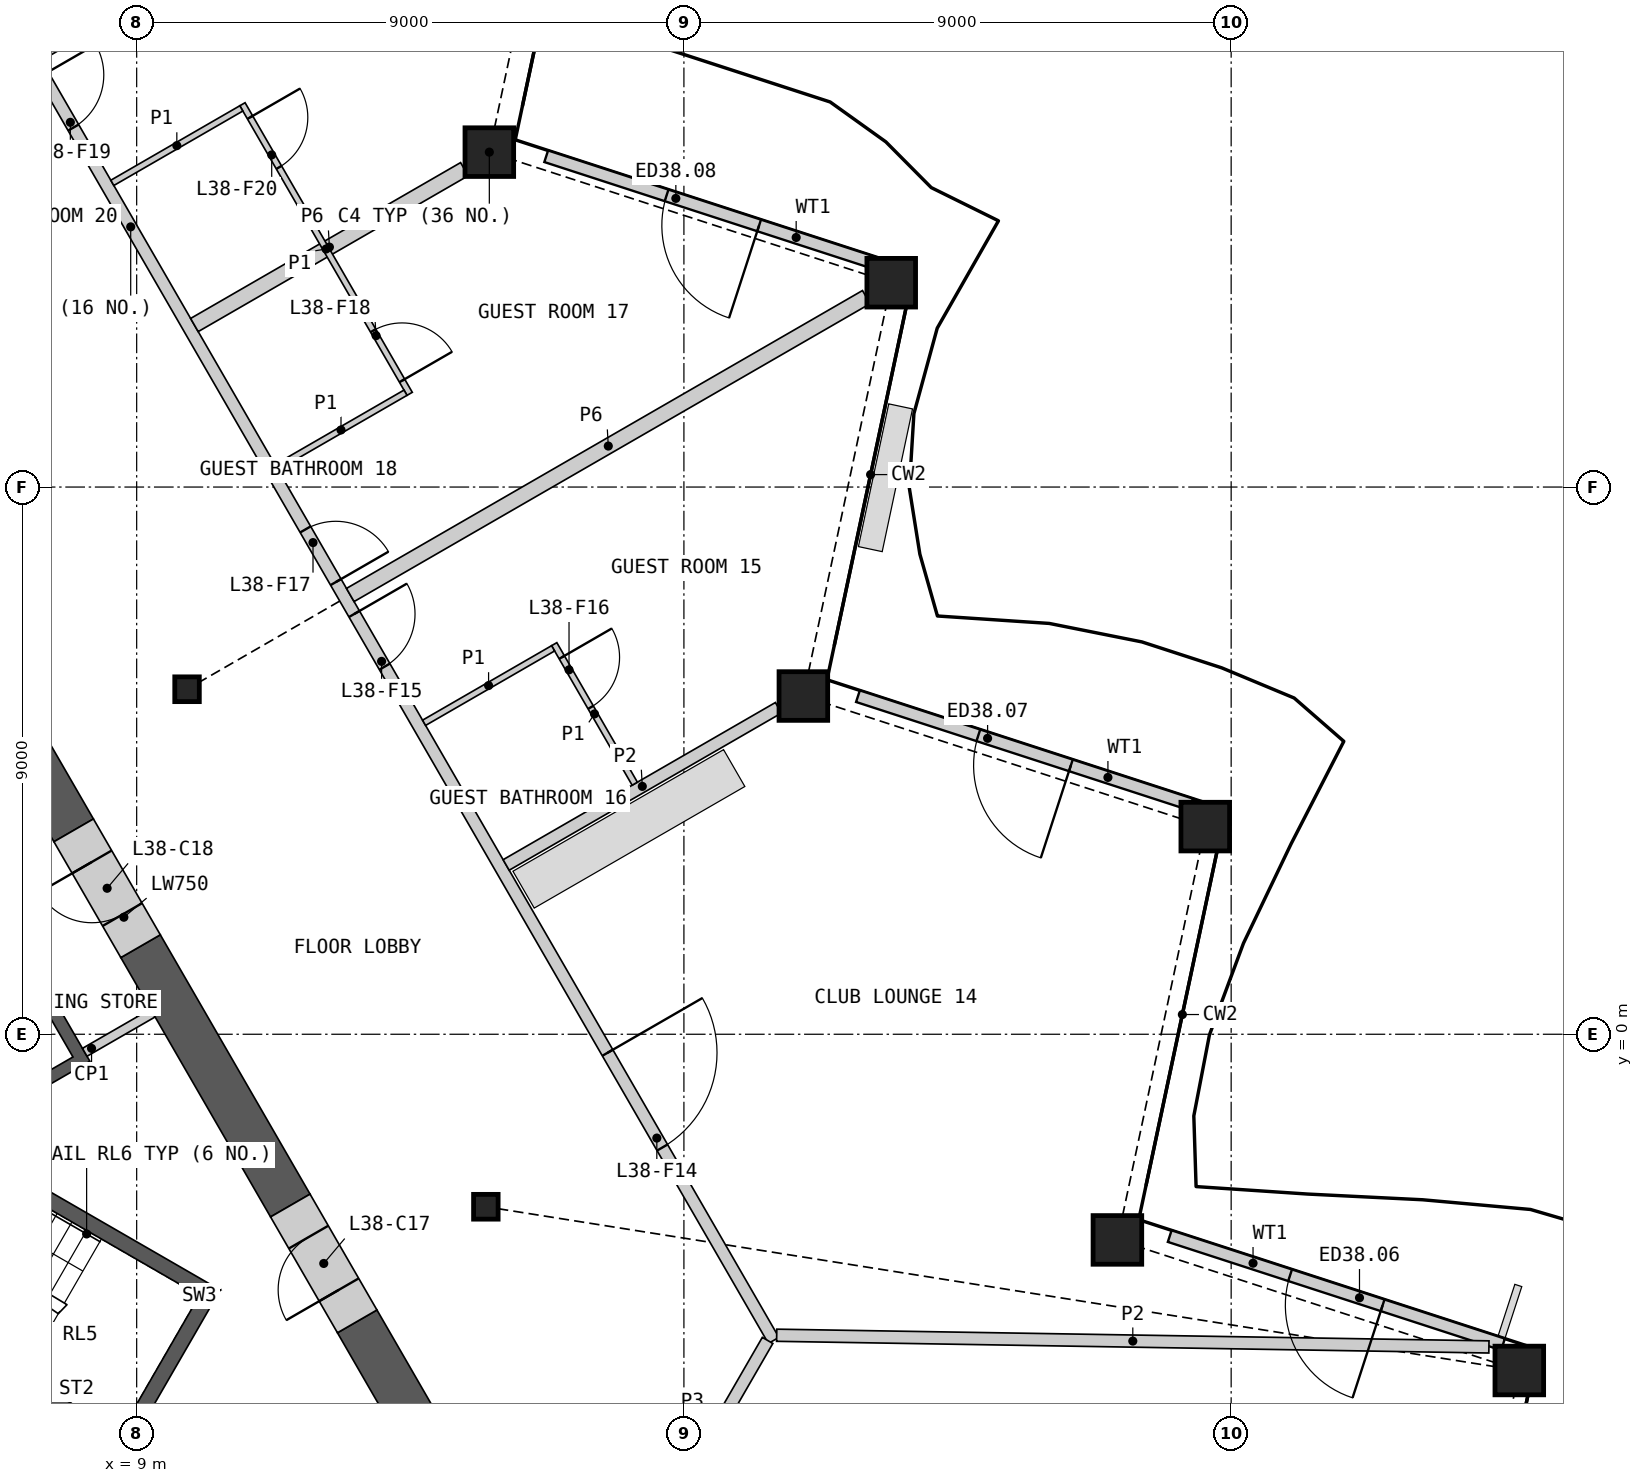
"""IFC4 building model, lengths in metres.
Left out: names, types, materials, properties, quantities, classifications, styles, units other than length and angle.
Written with IfcOpenShell. Run it as: python <this file> out.ifc"""

import sys

from ifc_helpers import new_model, si_unit, direction, frame, frame_2d, origin, origin_2d, place, context, subcontext, project, spatial, polyline, rectangle, hollow_rectangle, i_section, outline, extrude, element, fill, save


model = new_model("IFC4")
c1 = context("Model", 3, precision=1e-05, world=origin(), true_north=direction((0.0, 1.0)))
c2 = subcontext(c1, "Body", "Model", "MODEL_VIEW")
j1 = project(units=[si_unit("LENGTHUNIT", "METRE"), si_unit("PLANEANGLEUNIT", "RADIAN")], contexts=[c1])
p1 = place(None, origin())
s1 = spatial("IfcSite", under=j1, at=p1, CompositionType="ELEMENT")
p2 = place(p1, origin())
s2 = spatial("IfcBuilding", under=s1, at=p2, CompositionType="ELEMENT")
p3 = place(p2, frame((0.0, 0.0, 180.0)))
s3 = spatial("IfcBuildingStorey", under=s2, at=p3, CompositionType="ELEMENT", Elevation=180.0)
for number, where, z_axis, x_axis in (
    (1, (31.739, -5.53, 0.0), (0.0, 0.0, 1.0), (1.0, 0.0, 0.0)),
    (2, (25.129, -3.383, 0.0), (0.0, 0.0, 1.0), (1.0, 0.0, 0.0)),
    (3, (26.574, 3.415, 0.0), (0.0, 0.0, 1.0), (1.0, 0.0, 0.0)),
    (4, (19.965, 5.563, 0.0), (0.0, 0.0, 1.0), (1.0, 0.0, 0.0)),
    (5, (21.409, 12.361, 0.0), (0.0, 0.0, 1.0), (1.0, 0.0, 0.0)),
    (6, (14.8, 14.508, 0.0), (0.0, 0.0, 1.0), (1.0, 0.0, 0.0)),
):
    element("IfcColumn", number, at=place(p3, frame(where, z_axis=z_axis, x_axis=x_axis)), inside=s3, PredefinedType="COLUMN", context=c2, shape_type="SweptSolid", body=[
        extrude(hollow_rectangle(XDim=0.8, YDim=0.8, WallThickness=0.05, at=origin_2d()), origin(), (0.0, 0.0, 1.0), 3.6),
    ])
for number, where, z_axis, x_axis in (
    (7, (14.743, -2.837, 0.0), (0.0, 0.0, 1.0), (1.0, 0.0, 0.0)),
    (8, (9.828, 5.675, 0.0), (0.0, 0.0, 1.0), (1.0, 0.0, 0.0)),
):
    element("IfcColumn", number, at=place(p3, frame(where, z_axis=z_axis, x_axis=x_axis)), inside=s3, PredefinedType="COLUMN", context=c2, shape_type="SweptSolid", body=[
        extrude(i_section(OverallWidth=0.404, OverallDepth=0.407, WebThickness=0.027, FlangeThickness=0.044, at=origin_2d()), origin(), (0.0, 0.0, 1.0), 3.6),
    ])
p4 = place(p3, frame((31.471, -5.101, 0.0), z_axis=(0.0, 0.0, 1.0), x_axis=(-0.951053678976, 0.30902572661, 0.0)))
e9 = element("IfcWall", 9, at=p4, inside=s3, PredefinedType="SOLIDWALL", context=c2, shape_type="SweptSolid", body=[
    extrude(rectangle(XDim=5.763, YDim=0.2, at=frame_2d((2.882, 0.0))), origin(), (0.0, 0.0, 1.0), 2.701),
])
p5 = place(p4, frame((2.082, 0.0, 0.0)))
e10 = element("IfcOpeningElement", 10, at=p5, cuts=e9, PredefinedType="OPENING", context=c2, shape_type="SweptSolid", body=[
    extrude(rectangle(XDim=1.6, YDim=2.4, at=frame_2d((0.8, 1.2))), frame((0.0, 0.11, 0.0), z_axis=(0.0, -1.0, 0.0), x_axis=(1.0, 0.0, 0.0)), (0.0, 0.0, 1.0), 0.22),
])
p6 = place(p3, frame((26.344, 3.779, 0.0), z_axis=(0.0, 0.0, 1.0), x_axis=(-0.951049633358, 0.309038177075, 0.0)))
e11 = element("IfcWall", 11, at=p6, inside=s3, PredefinedType="SOLIDWALL", context=c2, shape_type="SweptSolid", body=[
    extrude(rectangle(XDim=5.763, YDim=0.2, at=frame_2d((2.881, 0.0))), origin(), (0.0, 0.0, 1.0), 2.701),
])
p7 = place(p6, frame((2.082, 0.0, 0.0)))
e12 = element("IfcOpeningElement", 12, at=p7, cuts=e11, PredefinedType="OPENING", context=c2, shape_type="SweptSolid", body=[
    extrude(rectangle(XDim=1.6, YDim=2.4, at=frame_2d((0.8, 1.2))), frame((0.0, 0.11, 0.0), z_axis=(0.0, -1.0, 0.0), x_axis=(1.0, 0.0, 0.0)), (0.0, 0.0, 1.0), 0.22),
])
p8 = place(p3, frame((21.217, 12.659, 0.0), z_axis=(0.0, 0.0, 1.0), x_axis=(-0.951053678976, 0.30902572661, 0.0)))
e13 = element("IfcWall", 13, at=p8, inside=s3, PredefinedType="SOLIDWALL", context=c2, shape_type="SweptSolid", body=[
    extrude(rectangle(XDim=5.763, YDim=0.2, at=frame_2d((2.882, 0.0))), origin(), (0.0, 0.0, 1.0), 2.701),
])
p9 = place(p8, frame((2.082, 0.0, 0.0)))
e14 = element("IfcOpeningElement", 14, at=p9, cuts=e13, PredefinedType="OPENING", context=c2, shape_type="SweptSolid", body=[
    extrude(rectangle(XDim=1.6, YDim=2.4, at=frame_2d((0.8, 1.2))), frame((0.0, 0.11, 0.0), z_axis=(0.0, -1.0, 0.0), x_axis=(1.0, 0.0, 0.0)), (0.0, 0.0, 1.0), 0.22),
])
p10 = place(p3, origin())
e15 = element("IfcWall", 15, at=p10, inside=s3, PredefinedType="SHEAR", context=c2, shape_type="SweptSolid", body=[
    extrude(outline(polyline([(3.76, 2.287), (5.931, 3.54), (8.231, -0.444), (6.061, -1.697), (5.96, -1.524), (7.952, -0.374), (5.852, 3.263), (3.861, 2.113), (3.76, 2.287)])), origin(), (0.0, 0.0, 1.0), 3.25),
])
p11 = place(p3, origin())
e16 = element("IfcWall", 16, at=p11, inside=s3, PredefinedType="SHEAR", context=c2, shape_type="SweptSolid", body=[
    extrude(outline(polyline([(3.763, -3.956), (8.83, -6.881), (8.738, -6.539), (3.888, -3.739), (3.763, -3.956)])), origin(), (0.0, 0.0, 1.0), 3.25),
])
p12 = place(p3, origin())
e17 = element("IfcWall", 17, at=p12, inside=s3, PredefinedType="SHEAR", context=c2, shape_type="SweptSolid", body=[
    extrude(outline(polyline([(8.83, -6.881), (10.374, -4.206), (10.032, -4.298), (8.738, -6.539), (8.83, -6.881)])), origin(), (0.0, 0.0, 1.0), 3.25),
])
p13 = place(p3, origin())
e18 = element("IfcWall", 18, at=p13, inside=s3, PredefinedType="SHEAR", context=c2, shape_type="SweptSolid", body=[
    extrude(outline(polyline([(10.032, -4.298), (10.374, -4.206), (5.307, -1.281), (5.182, -1.498), (10.032, -4.298)])), origin(), (0.0, 0.0, 1.0), 3.25),
])
p14 = place(p3, frame((9.266, 0.349, 0.0), z_axis=(0.0, 0.0, 1.0), x_axis=(-0.866003189247, -0.500038474733, 0.0)))
e19 = element("IfcWall", 19, at=p14, inside=s3, PredefinedType="PARTITIONING", context=c2, shape_type="SweptSolid", body=[
    extrude(rectangle(XDim=1.293, YDim=0.15, at=frame_2d((0.646, 0.0))), origin(), (0.0, 0.0, 1.0), 3.25),
])
p15 = place(p3, frame((7.964, 3.354, 0.0), z_axis=(0.0, 0.0, 1.0), x_axis=(-0.50002928721, 0.866008494146, 0.0)))
e20 = element("IfcWall", 20, at=p15, inside=s3, PredefinedType="SHEAR", context=c2, shape_type="SweptSolid", body=[
    extrude(rectangle(XDim=6.405, YDim=0.75, at=frame_2d((3.203, 0.0))), origin(), (0.0, 0.0, 1.0), 3.25),
])
p16 = place(p3, frame((11.527, -2.817, 0.0), z_axis=(0.0, 0.0, 1.0), x_axis=(-0.50001992892, 0.866013897511, 0.0)))
e21 = element("IfcWall", 21, at=p16, inside=s3, PredefinedType="SHEAR", context=c2, shape_type="SweptSolid", body=[
    extrude(rectangle(XDim=4.926, YDim=0.75, at=frame_2d((2.463, 0.0))), origin(), (0.0, 0.0, 1.0), 3.25),
])
p17 = place(p3, frame((14.526, -8.011, 0.0), z_axis=(0.0, 0.0, 1.0), x_axis=(-0.499996970966, 0.866027152591, 0.0)))
e22 = element("IfcWall", 22, at=p17, inside=s3, PredefinedType="SHEAR", context=c2, shape_type="SweptSolid", body=[
    extrude(rectangle(XDim=3.798, YDim=0.75, at=frame_2d((1.899, 0.0))), origin(), (0.0, 0.0, 1.0), 3.25),
])
p18 = place(p3, frame((12.627, -4.722, 0.0), z_axis=(0.0, 0.0, 1.0), x_axis=(-0.499946605688, 0.86605622881, 0.0)))
e23 = element("IfcWall", 23, at=p18, inside=s3, PredefinedType="SHEAR", context=c2, shape_type="SweptSolid", body=[
    extrude(rectangle(XDim=2.2, YDim=0.75, at=frame_2d((1.1, 0.0))), origin(), (0.0, 0.0, 1.0), 3.25),
])
p19 = place(p18, frame((0.6, 0.0, 0.0)))
e24 = element("IfcOpeningElement", 24, at=p19, cuts=e23, PredefinedType="OPENING", context=c2, shape_type="SweptSolid", body=[
    extrude(rectangle(XDim=1.0, YDim=2.1, at=frame_2d((0.5, 1.05))), frame((0.0, 0.385, 0.0), z_axis=(0.0, -1.0, 0.0), x_axis=(1.0, 0.0, 0.0)), (0.0, 0.0, 1.0), 0.77),
])
p20 = place(p3, frame((9.064, 1.448, 0.0), z_axis=(0.0, 0.0, 1.0), x_axis=(-0.50002983664, 0.866008176907, 0.0)))
e25 = element("IfcWall", 25, at=p20, inside=s3, PredefinedType="SHEAR", context=c2, shape_type="SweptSolid", body=[
    extrude(rectangle(XDim=2.2, YDim=0.75, at=frame_2d((1.1, 0.0))), origin(), (0.0, 0.0, 1.0), 3.25),
])
p21 = place(p20, frame((0.6, 0.0, 0.0)))
e26 = element("IfcOpeningElement", 26, at=p21, cuts=e25, PredefinedType="OPENING", context=c2, shape_type="SweptSolid", body=[
    extrude(rectangle(XDim=1.0, YDim=2.1, at=frame_2d((0.5, 1.05))), frame((0.0, 0.385, 0.0), z_axis=(0.0, -1.0, 0.0), x_axis=(1.0, 0.0, 0.0)), (0.0, 0.0, 1.0), 0.77),
])
p22 = place(p3, frame((5.377, 19.385, 0.0), z_axis=(0.0, 0.0, 1.0), x_axis=(0.500000757641, -0.86602496636, 0.0)))
e27 = element("IfcWall", 27, at=p22, inside=s3, PredefinedType="PARTITIONING", context=c2, shape_type="SweptSolid", body=[
    extrude(rectangle(XDim=28.198, YDim=0.2, at=frame_2d((14.099, 0.0))), origin(), (0.0, 0.0, 1.0), 3.25),
])
p23 = place(p22, frame((22.735, 0.0, 0.0)))
e28 = element("IfcOpeningElement", 28, at=p23, cuts=e27, PredefinedType="OPENING", context=c2, shape_type="SweptSolid", body=[
    extrude(rectangle(XDim=1.8, YDim=2.1, at=frame_2d((0.9, 1.05))), frame((0.0, 0.11, 0.0), z_axis=(0.0, -1.0, 0.0), x_axis=(1.0, 0.0, 0.0)), (0.0, 0.0, 1.0), 0.22),
])
p24 = place(p22, frame((14.402, 0.0, 0.0)))
e29 = element("IfcOpeningElement", 29, at=p24, cuts=e27, PredefinedType="OPENING", context=c2, shape_type="SweptSolid", body=[
    extrude(rectangle(XDim=1.0, YDim=2.1, at=frame_2d((0.5, 1.05))), frame((0.0, 0.11, 0.0), z_axis=(0.0, -1.0, 0.0), x_axis=(1.0, 0.0, 0.0)), (0.0, 0.0, 1.0), 0.22),
])
p25 = place(p22, frame((12.796, 0.0, 0.0)))
e30 = element("IfcOpeningElement", 30, at=p25, cuts=e27, PredefinedType="OPENING", context=c2, shape_type="SweptSolid", body=[
    extrude(rectangle(XDim=1.0, YDim=2.1, at=frame_2d((0.5, 1.05))), frame((0.0, 0.11, 0.0), z_axis=(0.0, -1.0, 0.0), x_axis=(1.0, 0.0, 0.0)), (0.0, 0.0, 1.0), 0.22),
])
p26 = place(p22, frame((4.164, 0.0, 0.0)))
e31 = element("IfcOpeningElement", 31, at=p26, cuts=e27, PredefinedType="OPENING", context=c2, shape_type="SweptSolid", body=[
    extrude(rectangle(XDim=1.0, YDim=2.1, at=frame_2d((0.5, 1.05))), frame((0.0, 0.11, 0.0), z_axis=(0.0, -1.0, 0.0), x_axis=(1.0, 0.0, 0.0)), (0.0, 0.0, 1.0), 0.22),
])
p27 = place(p22, frame((1.452, 0.0, 0.0)))
e32 = element("IfcOpeningElement", 32, at=p27, cuts=e27, PredefinedType="OPENING", context=c2, shape_type="SweptSolid", body=[
    extrude(rectangle(XDim=0.95, YDim=2.1, at=frame_2d((0.475, 1.05))), frame((0.0, 0.11, 0.0), z_axis=(0.0, -1.0, 0.0), x_axis=(1.0, 0.0, 0.0)), (0.0, 0.0, 1.0), 0.22),
])
p28 = place(p3, frame((12.513, 7.225, 0.0), z_axis=(0.0, 0.0, 1.0), x_axis=(0.866032905446, 0.499987006516, 0.0)))
e33 = element("IfcWall", 33, at=p28, inside=s3, PredefinedType="PARTITIONING", context=c2, shape_type="SweptSolid", body=[
    extrude(rectangle(XDim=9.799, YDim=0.25, at=frame_2d((4.899, 0.0))), origin(), (0.0, 0.0, 1.0), 2.404),
])
p29 = place(p3, frame((9.95, 11.665, 0.0), z_axis=(0.0, 0.0, 1.0), x_axis=(0.86603095744, 0.499990380663, 0.0)))
e34 = element("IfcWall", 34, at=p29, inside=s3, PredefinedType="PARTITIONING", context=c2, shape_type="SweptSolid", body=[
    extrude(rectangle(XDim=5.127, YDim=0.25, at=frame_2d((2.563, 0.0))), origin(), (0.0, 0.0, 1.0), 2.404),
])
p30 = place(p3, frame((17.875, -7.635, 0.0), z_axis=(0.0, 0.0, 1.0), x_axis=(0.499952404951, 0.866052881055, 0.0)))
e35 = element("IfcWall", 35, at=p30, inside=s3, PredefinedType="PARTITIONING", context=c2, shape_type="SweptSolid", body=[
    extrude(rectangle(XDim=3.002, YDim=0.2, at=frame_2d((1.501, 0.0))), origin(), (0.0, 0.0, 1.0), 3.25),
])
p31 = place(p3, frame((19.526, -4.95, 0.0), z_axis=(0.0, 0.0, 1.0), x_axis=(0.99986514458, -0.016422321819, 0.0)))
e36 = element("IfcWall", 36, at=p31, inside=s3, PredefinedType="PARTITIONING", context=c2, shape_type="SweptSolid", body=[
    extrude(rectangle(XDim=11.715, YDim=0.2, at=frame_2d((5.857, 0.0))), origin(), (0.0, 0.0, 1.0), 2.404),
])
p32 = place(p3, frame((7.386, 16.105, 0.0), z_axis=(0.0, 0.0, 1.0), x_axis=(0.866023056814, 0.500004065051, 0.0)))
e37 = element("IfcWall", 37, at=p32, inside=s3, PredefinedType="PARTITIONING", context=c2, shape_type="SweptSolid", body=[
    extrude(rectangle(XDim=9.756, YDim=0.2, at=frame_2d((4.878, 0.0))), origin(), (0.0, 0.0, 1.0), 2.404),
])
p33 = place(p3, frame((15.077, 2.784, 0.0), z_axis=(0.0, 0.0, 1.0), x_axis=(0.866020469142, 0.500008546953, 0.0)))
e38 = element("IfcWall", 38, at=p33, inside=s3, PredefinedType="PARTITIONING", context=c2, shape_type="SweptSolid", body=[
    extrude(rectangle(XDim=5.171, YDim=0.2, at=frame_2d((2.585, 0.0))), origin(), (0.0, 0.0, 1.0), 2.404),
])
p34 = place(p3, frame((10.74, 15.296, 0.0), z_axis=(0.0, 0.0, 1.0), x_axis=(0.500015767406, -0.866016300277, 0.0)))
e39 = element("IfcWall", 39, at=p34, inside=s3, PredefinedType="PARTITIONING", context=c2, shape_type="SweptSolid", body=[
    extrude(rectangle(XDim=5.5, YDim=0.1, at=frame_2d((2.75, 0.0))), origin(), (0.0, 0.0, 1.0), 2.404),
])
p35 = place(p34, frame((4.3, 0.0, 0.0)))
e40 = element("IfcOpeningElement", 40, at=p35, cuts=e39, PredefinedType="OPENING", context=c2, shape_type="SweptSolid", body=[
    extrude(rectangle(XDim=0.95, YDim=2.1, at=frame_2d((0.475, 1.05))), frame((0.0, 0.06, 0.0), z_axis=(0.0, -1.0, 0.0), x_axis=(1.0, 0.0, 0.0)), (0.0, 0.0, 1.0), 0.12),
])
p36 = place(p34, frame((0.25, 0.0, 0.0)))
e41 = element("IfcOpeningElement", 41, at=p36, cuts=e39, PredefinedType="OPENING", context=c2, shape_type="SweptSolid", body=[
    extrude(rectangle(XDim=0.95, YDim=2.1, at=frame_2d((0.475, 1.05))), frame((0.0, 0.06, 0.0), z_axis=(0.0, -1.0, 0.0), x_axis=(1.0, 0.0, 0.0)), (0.0, 0.0, 1.0), 0.12),
])
p37 = place(p3, frame((15.867, 6.416, 0.0), z_axis=(0.0, 0.0, 1.0), x_axis=(0.500062700197, -0.865989200783, 0.0)))
e42 = element("IfcWall", 42, at=p37, inside=s3, PredefinedType="PARTITIONING", context=c2, shape_type="SweptSolid", body=[
    extrude(rectangle(XDim=2.65, YDim=0.1, at=frame_2d((1.325, 0.0))), origin(), (0.0, 0.0, 1.0), 2.404),
])
p38 = place(p37, frame((0.25, 0.0, 0.0)))
e43 = element("IfcOpeningElement", 43, at=p38, cuts=e42, PredefinedType="OPENING", context=c2, shape_type="SweptSolid", body=[
    extrude(rectangle(XDim=0.95, YDim=2.1, at=frame_2d((0.475, 1.05))), frame((0.0, 0.06, 0.0), z_axis=(0.0, -1.0, 0.0), x_axis=(1.0, 0.0, 0.0)), (0.0, 0.0, 1.0), 0.12),
])
p39 = place(p3, frame((13.727, 5.123, 0.0), z_axis=(0.0, 0.0, 1.0), x_axis=(0.866032905446, 0.499987006516, 0.0)))
e44 = element("IfcWall", 44, at=p39, inside=s3, PredefinedType="PARTITIONING", context=c2, shape_type="SweptSolid", body=[
    extrude(rectangle(XDim=2.45, YDim=0.1, at=frame_2d((1.225, 0.0))), origin(), (0.0, 0.0, 1.0), 2.404),
])
p40 = place(p3, frame((11.3, 9.326, 0.0), z_axis=(0.0, 0.0, 1.0), x_axis=(0.866014668023, 0.500018594424, 0.0)))
e45 = element("IfcWall", 45, at=p40, inside=s3, PredefinedType="PARTITIONING", context=c2, shape_type="SweptSolid", body=[
    extrude(rectangle(XDim=2.45, YDim=0.1, at=frame_2d((1.225, 0.0))), origin(), (0.0, 0.0, 1.0), 2.404),
])
p41 = place(p3, frame((8.6, 14.003, 0.0), z_axis=(0.0, 0.0, 1.0), x_axis=(0.866032905446, 0.499987006516, 0.0)))
e46 = element("IfcWall", 46, at=p41, inside=s3, PredefinedType="PARTITIONING", context=c2, shape_type="SweptSolid", body=[
    extrude(rectangle(XDim=2.45, YDim=0.1, at=frame_2d((1.225, 0.0))), origin(), (0.0, 0.0, 1.0), 2.404),
])
p42 = place(p5, origin())
e47 = element("IfcDoor", 47, at=p42, inside=s3, OperationType="DOUBLE_DOOR_SINGLE_SWING", PredefinedType="DOOR", context=c2, shape_type="SweptSolid", body=[
    extrude(rectangle(XDim=1.6, YDim=2.4, at=frame_2d((0.8, 1.2))), frame((0.0, 0.025, 0.0), z_axis=(0.0, -1.0, 0.0), x_axis=(1.0, 0.0, 0.0)), (0.0, 0.0, 1.0), 0.05),
])
fill(e10, e47)
p43 = place(p7, origin())
e48 = element("IfcDoor", 48, at=p43, inside=s3, OperationType="DOUBLE_DOOR_SINGLE_SWING", PredefinedType="DOOR", context=c2, shape_type="SweptSolid", body=[
    extrude(rectangle(XDim=1.6, YDim=2.4, at=frame_2d((0.8, 1.2))), frame((0.0, 0.025, 0.0), z_axis=(0.0, -1.0, 0.0), x_axis=(1.0, 0.0, 0.0)), (0.0, 0.0, 1.0), 0.05),
])
fill(e12, e48)
p44 = place(p9, origin())
e49 = element("IfcDoor", 49, at=p44, inside=s3, OperationType="DOUBLE_DOOR_SINGLE_SWING", PredefinedType="DOOR", context=c2, shape_type="SweptSolid", body=[
    extrude(rectangle(XDim=1.6, YDim=2.4, at=frame_2d((0.8, 1.2))), frame((0.0, 0.025, 0.0), z_axis=(0.0, -1.0, 0.0), x_axis=(1.0, 0.0, 0.0)), (0.0, 0.0, 1.0), 0.05),
])
fill(e14, e49)
p45 = place(p19, origin())
e50 = element("IfcDoor", 50, at=p45, inside=s3, OperationType="SINGLE_SWING_LEFT", PredefinedType="DOOR", context=c2, shape_type="SweptSolid", body=[
    extrude(rectangle(XDim=1.0, YDim=2.1, at=frame_2d((0.5, 1.05))), frame((0.0, 0.13, 0.0), z_axis=(0.0, -1.0, 0.0), x_axis=(1.0, 0.0, 0.0)), (0.0, 0.0, 1.0), 0.05),
])
fill(e24, e50)
p46 = place(p21, origin())
e51 = element("IfcDoor", 51, at=p46, inside=s3, OperationType="SINGLE_SWING_RIGHT", PredefinedType="DOOR", context=c2, shape_type="SweptSolid", body=[
    extrude(rectangle(XDim=1.0, YDim=2.1, at=frame_2d((0.5, 1.05))), frame((0.0, 0.13, 0.0), z_axis=(0.0, -1.0, 0.0), x_axis=(1.0, 0.0, 0.0)), (0.0, 0.0, 1.0), 0.05),
])
fill(e26, e51)
p47 = place(p23, origin())
e52 = element("IfcDoor", 52, at=p47, inside=s3, OperationType="DOUBLE_DOOR_SINGLE_SWING", PredefinedType="DOOR", context=c2, shape_type="SweptSolid", body=[
    extrude(rectangle(XDim=1.8, YDim=2.1, at=frame_2d((0.9, 1.05))), frame((0.0, 0.025, 0.0), z_axis=(0.0, -1.0, 0.0), x_axis=(1.0, 0.0, 0.0)), (0.0, 0.0, 1.0), 0.05),
])
fill(e28, e52)
p48 = place(p24, origin())
e53 = element("IfcDoor", 53, at=p48, inside=s3, OperationType="SINGLE_SWING_LEFT", PredefinedType="DOOR", context=c2, shape_type="SweptSolid", body=[
    extrude(rectangle(XDim=1.0, YDim=2.1, at=frame_2d((0.5, 1.05))), frame((0.0, 0.025, 0.0), z_axis=(0.0, -1.0, 0.0), x_axis=(1.0, 0.0, 0.0)), (0.0, 0.0, 1.0), 0.05),
])
fill(e29, e53)
p49 = place(p38, origin())
e54 = element("IfcDoor", 54, at=p49, inside=s3, OperationType="SINGLE_SWING_LEFT", PredefinedType="DOOR", context=c2, shape_type="SweptSolid", body=[
    extrude(rectangle(XDim=0.95, YDim=2.1, at=frame_2d((0.475, 1.05))), frame((0.0, 0.025, 0.0), z_axis=(0.0, -1.0, 0.0), x_axis=(1.0, 0.0, 0.0)), (0.0, 0.0, 1.0), 0.05),
])
fill(e43, e54)
p50 = place(p25, origin())
e55 = element("IfcDoor", 55, at=p50, inside=s3, OperationType="SINGLE_SWING_RIGHT", PredefinedType="DOOR", context=c2, shape_type="SweptSolid", body=[
    extrude(rectangle(XDim=1.0, YDim=2.1, at=frame_2d((0.5, 1.05))), frame((0.0, 0.025, 0.0), z_axis=(0.0, -1.0, 0.0), x_axis=(1.0, 0.0, 0.0)), (0.0, 0.0, 1.0), 0.05),
])
fill(e30, e55)
p51 = place(p35, origin())
e56 = element("IfcDoor", 56, at=p51, inside=s3, OperationType="SINGLE_SWING_RIGHT", PredefinedType="DOOR", context=c2, shape_type="SweptSolid", body=[
    extrude(rectangle(XDim=0.95, YDim=2.1, at=frame_2d((0.475, 1.05))), frame((0.0, 0.025, 0.0), z_axis=(0.0, -1.0, 0.0), x_axis=(1.0, 0.0, 0.0)), (0.0, 0.0, 1.0), 0.05),
])
fill(e40, e56)
p52 = place(p26, origin())
e57 = element("IfcDoor", 57, at=p52, inside=s3, OperationType="SINGLE_SWING_LEFT", PredefinedType="DOOR", context=c2, shape_type="SweptSolid", body=[
    extrude(rectangle(XDim=1.0, YDim=2.1, at=frame_2d((0.5, 1.05))), frame((0.0, 0.025, 0.0), z_axis=(0.0, -1.0, 0.0), x_axis=(1.0, 0.0, 0.0)), (0.0, 0.0, 1.0), 0.05),
])
fill(e31, e57)
p53 = place(p36, origin())
e58 = element("IfcDoor", 58, at=p53, inside=s3, OperationType="SINGLE_SWING_LEFT", PredefinedType="DOOR", context=c2, shape_type="SweptSolid", body=[
    extrude(rectangle(XDim=0.95, YDim=2.1, at=frame_2d((0.475, 1.05))), frame((0.0, 0.025, 0.0), z_axis=(0.0, -1.0, 0.0), x_axis=(1.0, 0.0, 0.0)), (0.0, 0.0, 1.0), 0.05),
])
fill(e41, e58)
save(model, sys.argv[1])
